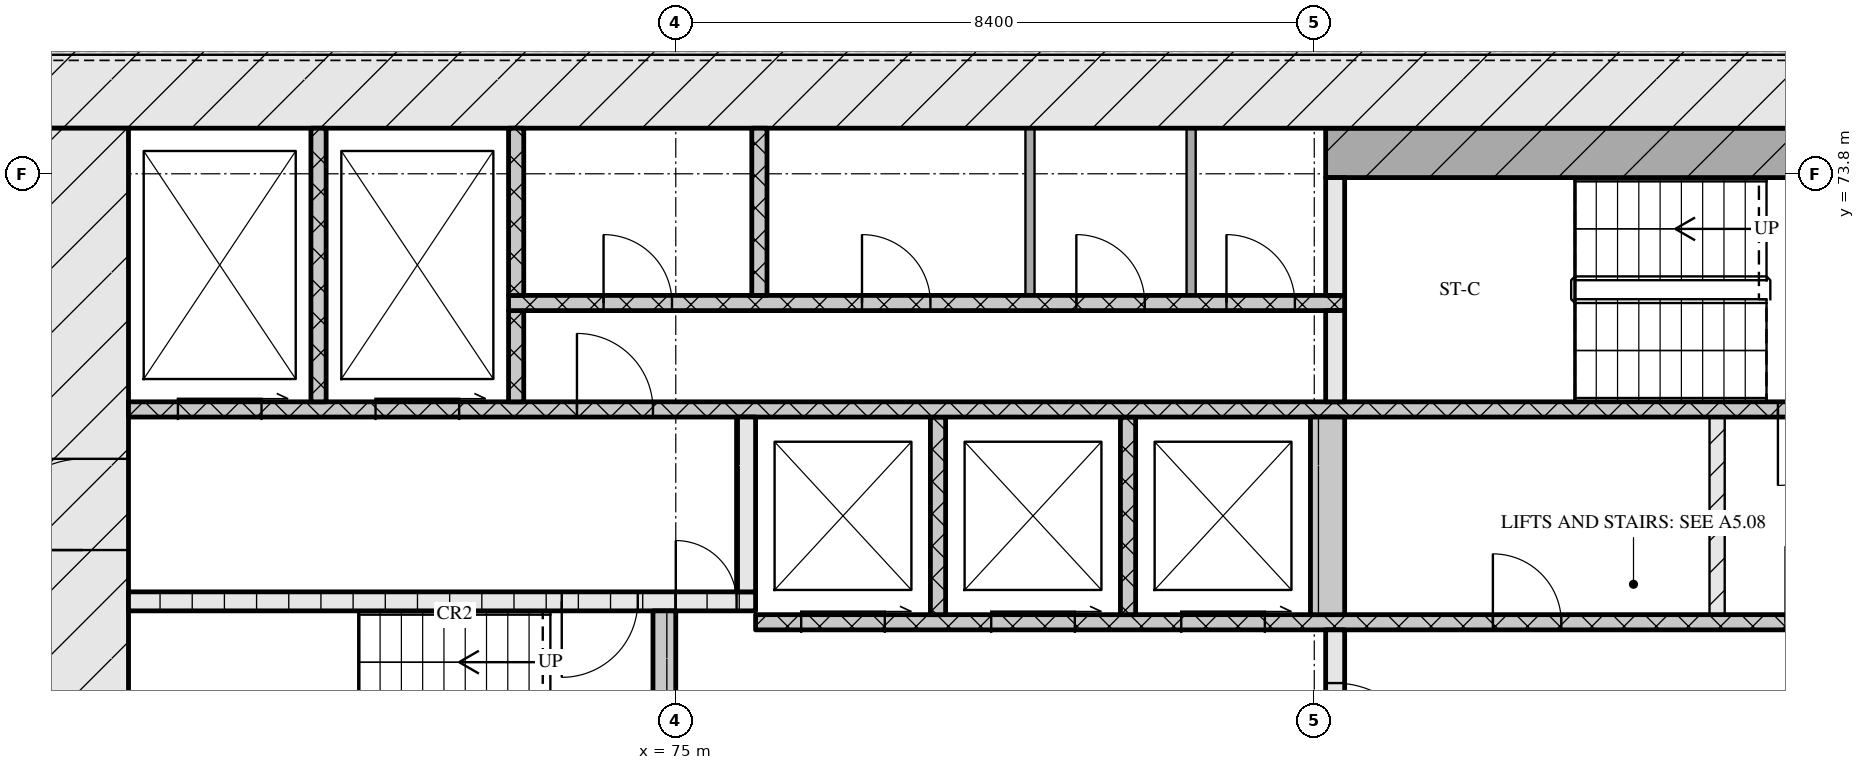
"""IFC4 building model, lengths in metres.
Left out: names, types, materials, properties, quantities, classifications, styles, units other than length and angle.
Written with IfcOpenShell. Run it as: python <this file> out.ifc"""

import sys

from ifc_helpers import new_model, si_unit, direction, frame, frame_2d, origin, place, context, subcontext, project, spatial, rectangle, extrude, element, fill, save


model = new_model("IFC4")
c1 = context("Model", 3, precision=1e-05, world=origin(), true_north=direction((0.0, 1.0)))
c2 = subcontext(c1, "Body", "Model", "MODEL_VIEW")
j1 = project(units=[si_unit("LENGTHUNIT", "METRE"), si_unit("PLANEANGLEUNIT", "RADIAN")], contexts=[c1])
p1 = place(None, origin())
s1 = spatial("IfcSite", under=j1, at=p1, CompositionType="ELEMENT")
p2 = place(p1, origin())
s2 = spatial("IfcBuilding", under=s1, at=p2, CompositionType="ELEMENT")
p3 = place(p2, frame((0.0, 0.0, 51.6)))
s3 = spatial("IfcBuildingStorey", under=s2, at=p3, CompositionType="ELEMENT", Elevation=51.6)
p4 = place(p3, frame((66.6, 75.0, 0.0), z_axis=(0.0, 0.0, 1.0), x_axis=(1.0, 0.0, 0.0)))
e1 = element("IfcWall", 1, at=p4, inside=s3, PredefinedType="SOLIDWALL", context=c2, shape_type="SweptSolid", body=[
    extrude(rectangle(XDim=42.0, YDim=1.2, at=frame_2d((21.0, 0.0))), origin(), (0.0, 0.0, 1.0), 3.32),
])
p5 = place(p3, frame((67.2, 62.4, 0.0), z_axis=(0.0, 0.0, 1.0), x_axis=(0.0, 1.0, 0.0)))
e2 = element("IfcWall", 2, at=p5, inside=s3, PredefinedType="SOLIDWALL", context=c2, shape_type="SweptSolid", body=[
    extrude(rectangle(XDim=12.0, YDim=1.2, at=frame_2d((6.0, 0.0))), origin(), (0.0, 0.0, 1.0), 3.32),
])
p6 = place(p5, frame((6.45, 0.0, 0.0)))
e3 = element("IfcOpeningElement", 3, at=p6, cuts=e2, PredefinedType="OPENING", context=c2, shape_type="SweptSolid", body=[
    extrude(rectangle(XDim=1.2, YDim=2.1, at=frame_2d((0.6, 1.05))), frame((0.0, 0.61, 0.0), z_axis=(0.0, -1.0, 0.0), x_axis=(1.0, 0.0, 0.0)), (0.0, 0.0, 1.0), 1.22),
])
p7 = place(p3, frame((74.85, 65.2, 0.0), z_axis=(0.0, 0.0, 1.0), x_axis=(0.0, 1.0, 0.0)))
e4 = element("IfcWall", 4, at=p7, inside=s3, PredefinedType="SOLIDWALL", context=c2, shape_type="SweptSolid", body=[
    extrude(rectangle(XDim=2.85, YDim=0.3, at=frame_2d((1.425, 0.0))), origin(), (0.0, 0.0, 1.0), 3.32),
])
p8 = place(p3, frame((83.675, 65.2, 0.0), z_axis=(0.0, 0.0, 1.0), x_axis=(0.0, 1.0, 0.0)))
e5 = element("IfcWall", 5, at=p8, inside=s3, PredefinedType="SOLIDWALL", context=c2, shape_type="SweptSolid", body=[
    extrude(rectangle(XDim=2.6, YDim=0.25, at=frame_2d((1.3, 0.0))), origin(), (0.0, 0.0, 1.0), 3.32),
])
p9 = place(p8, frame((0.7, 0.0, 0.0)))
e6 = element("IfcOpeningElement", 6, at=p9, cuts=e5, PredefinedType="OPENING", context=c2, shape_type="SweptSolid", body=[
    extrude(rectangle(XDim=1.2, YDim=2.1, at=frame_2d((0.6, 1.05))), frame((0.0, 0.135, 0.0), z_axis=(0.0, -1.0, 0.0), x_axis=(1.0, 0.0, 0.0)), (0.0, 0.0, 1.0), 0.27),
])
p10 = place(p3, frame((76.05, 67.9, 0.0), z_axis=(0.0, 0.0, 1.0), x_axis=(1.0, 0.0, 0.0)))
e7 = element("IfcWall", 7, at=p10, inside=s3, PredefinedType="SOLIDWALL", context=c2, shape_type="SweptSolid", body=[
    extrude(rectangle(XDim=23.1, YDim=0.2, at=frame_2d((11.55, 0.0))), origin(), (0.0, 0.0, 1.0), 3.32),
])
p11 = place(p10, frame((0.6, 0.0, 0.0)))
e8 = element("IfcOpeningElement", 8, at=p11, cuts=e7, PredefinedType="OPENING", context=c2, shape_type="SweptSolid", body=[
    extrude(rectangle(XDim=1.1, YDim=2.1, at=frame_2d((0.55, 1.05))), frame((0.0, 0.11, 0.0), z_axis=(0.0, -1.0, 0.0), x_axis=(1.0, 0.0, 0.0)), (0.0, 0.0, 1.0), 0.22),
])
p12 = place(p10, frame((3.1, 0.0, 0.0)))
e9 = element("IfcOpeningElement", 9, at=p12, cuts=e7, PredefinedType="OPENING", context=c2, shape_type="SweptSolid", body=[
    extrude(rectangle(XDim=1.1, YDim=2.1, at=frame_2d((0.55, 1.05))), frame((0.0, 0.11, 0.0), z_axis=(0.0, -1.0, 0.0), x_axis=(1.0, 0.0, 0.0)), (0.0, 0.0, 1.0), 0.22),
])
p13 = place(p10, frame((5.6, 0.0, 0.0)))
e10 = element("IfcOpeningElement", 10, at=p13, cuts=e7, PredefinedType="OPENING", context=c2, shape_type="SweptSolid", body=[
    extrude(rectangle(XDim=1.1, YDim=2.1, at=frame_2d((0.55, 1.05))), frame((0.0, 0.11, 0.0), z_axis=(0.0, -1.0, 0.0), x_axis=(1.0, 0.0, 0.0)), (0.0, 0.0, 1.0), 0.22),
])
p14 = place(p10, frame((9.7, 0.0, 0.0)))
e11 = element("IfcOpeningElement", 11, at=p14, cuts=e7, PredefinedType="OPENING", context=c2, shape_type="SweptSolid", body=[
    extrude(rectangle(XDim=0.9, YDim=2.1, at=frame_2d((0.45, 1.05))), frame((0.0, 0.11, 0.0), z_axis=(0.0, -1.0, 0.0), x_axis=(1.0, 0.0, 0.0)), (0.0, 0.0, 1.0), 0.22),
])
p15 = place(p10, frame((13.55, 0.0, 0.0)))
e12 = element("IfcOpeningElement", 12, at=p15, cuts=e7, PredefinedType="OPENING", context=c2, shape_type="SweptSolid", body=[
    extrude(rectangle(XDim=1.0, YDim=2.1, at=frame_2d((0.5, 1.05))), frame((0.0, 0.11, 0.0), z_axis=(0.0, -1.0, 0.0), x_axis=(1.0, 0.0, 0.0)), (0.0, 0.0, 1.0), 0.22),
])
for number, where, z_axis, x_axis in (
    (13, (78.45, 68.0, 0.0), (0.0, 0.0, 1.0), (0.0, 1.0, 0.0)),
    (14, (80.95, 68.0, 0.0), (0.0, 0.0, 1.0), (0.0, 1.0, 0.0)),
):
    element("IfcWall", number, at=place(p3, frame(where, z_axis=z_axis, x_axis=x_axis)), inside=s3, PredefinedType="SOLIDWALL", context=c2, shape_type="SweptSolid", body=[
        extrude(rectangle(XDim=2.6, YDim=0.2, at=frame_2d((1.3, 0.0))), origin(), (0.0, 0.0, 1.0), 3.32),
    ])
p16 = place(p3, frame((83.575, 68.0, 0.0), z_axis=(0.0, 0.0, 1.0), x_axis=(0.0, 1.0, 0.0)))
e15 = element("IfcWall", 15, at=p16, inside=s3, PredefinedType="SOLIDWALL", context=c2, shape_type="SweptSolid", body=[
    extrude(rectangle(XDim=2.6, YDim=0.45, at=frame_2d((1.3, 0.0))), origin(), (0.0, 0.0, 1.0), 3.32),
])
p17 = place(p3, frame((88.7, 68.0, 0.0), z_axis=(0.0, 0.0, 1.0), x_axis=(0.0, 1.0, 0.0)))
e16 = element("IfcWall", 16, at=p17, inside=s3, PredefinedType="PARTITIONING", context=c2, shape_type="SweptSolid", body=[
    extrude(rectangle(XDim=2.6, YDim=0.2, at=frame_2d((1.3, 0.0))), origin(), (0.0, 0.0, 1.0), 3.32),
])
p18 = place(p3, frame((67.8, 68.175, 0.0), z_axis=(0.0, 0.0, 1.0), x_axis=(1.0, 0.0, 0.0)))
e17 = element("IfcWall", 17, at=p18, inside=s3, PredefinedType="SOLIDWALL", context=c2, shape_type="SweptSolid", body=[
    extrude(rectangle(XDim=8.25, YDim=0.25, at=frame_2d((4.125, 0.0))), origin(), (0.0, 0.0, 1.0), 3.32),
])
p19 = place(p18, frame((5.7, 0.0, 0.0)))
e18 = element("IfcOpeningElement", 18, at=p19, cuts=e17, PredefinedType="OPENING", context=c2, shape_type="SweptSolid", body=[
    extrude(rectangle(XDim=1.0, YDim=2.1, at=frame_2d((0.5, 1.05))), frame((0.0, 0.135, 0.0), z_axis=(0.0, -1.0, 0.0), x_axis=(1.0, 0.0, 0.0)), (0.0, 0.0, 1.0), 0.27),
])
p20 = place(p18, frame((7.2, 0.0, 0.0)))
e19 = element("IfcOpeningElement", 19, at=p20, cuts=e17, PredefinedType="OPENING", context=c2, shape_type="SweptSolid", body=[
    extrude(rectangle(XDim=0.8, YDim=2.1, at=frame_2d((0.4, 1.05))), frame((0.0, 0.135, 0.0), z_axis=(0.0, -1.0, 0.0), x_axis=(1.0, 0.0, 0.0)), (0.0, 0.0, 1.0), 0.27),
])
p21 = place(p3, frame((75.925, 68.3, 0.0), z_axis=(0.0, 0.0, 1.0), x_axis=(0.0, 1.0, 0.0)))
e20 = element("IfcWall", 20, at=p21, inside=s3, PredefinedType="SOLIDWALL", context=c2, shape_type="SweptSolid", body=[
    extrude(rectangle(XDim=2.3, YDim=0.25, at=frame_2d((1.15, 0.0))), origin(), (0.0, 0.0, 1.0), 3.32),
])
p22 = place(p3, frame((67.8, 70.7, 0.0), z_axis=(0.0, 0.0, 1.0), x_axis=(1.0, 0.0, 0.0)))
e21 = element("IfcWall", 21, at=p22, inside=s3, PredefinedType="SOLIDWALL", context=c2, shape_type="SweptSolid", body=[
    extrude(rectangle(XDim=39.6, YDim=0.2, at=frame_2d((19.8, 0.0))), origin(), (0.0, 0.0, 1.0), 3.32),
])
p23 = place(p22, frame((0.65, 0.0, 0.0)))
e22 = element("IfcOpeningElement", 22, at=p23, cuts=e21, PredefinedType="OPENING", context=c2, shape_type="SweptSolid", body=[
    extrude(rectangle(XDim=1.1, YDim=2.1, at=frame_2d((0.55, 1.05))), frame((0.0, 0.11, 0.0), z_axis=(0.0, -1.0, 0.0), x_axis=(1.0, 0.0, 0.0)), (0.0, 0.0, 1.0), 0.22),
])
p24 = place(p22, frame((3.25, 0.0, 0.0)))
e23 = element("IfcOpeningElement", 23, at=p24, cuts=e21, PredefinedType="OPENING", context=c2, shape_type="SweptSolid", body=[
    extrude(rectangle(XDim=1.1, YDim=2.1, at=frame_2d((0.55, 1.05))), frame((0.0, 0.11, 0.0), z_axis=(0.0, -1.0, 0.0), x_axis=(1.0, 0.0, 0.0)), (0.0, 0.0, 1.0), 0.22),
])
p25 = place(p22, frame((5.9, 0.0, 0.0)))
e24 = element("IfcOpeningElement", 24, at=p25, cuts=e21, PredefinedType="OPENING", context=c2, shape_type="SweptSolid", body=[
    extrude(rectangle(XDim=1.0, YDim=2.1, at=frame_2d((0.5, 1.05))), frame((0.0, 0.11, 0.0), z_axis=(0.0, -1.0, 0.0), x_axis=(1.0, 0.0, 0.0)), (0.0, 0.0, 1.0), 0.22),
])
p26 = place(p22, frame((21.7, 0.0, 0.0)))
e25 = element("IfcOpeningElement", 25, at=p26, cuts=e21, PredefinedType="OPENING", context=c2, shape_type="SweptSolid", body=[
    extrude(rectangle(XDim=1.0, YDim=2.1, at=frame_2d((0.5, 1.05))), frame((0.0, 0.11, 0.0), z_axis=(0.0, -1.0, 0.0), x_axis=(1.0, 0.0, 0.0)), (0.0, 0.0, 1.0), 0.22),
])
p27 = place(p22, frame((32.7, 0.0, 0.0)))
e26 = element("IfcOpeningElement", 26, at=p27, cuts=e21, PredefinedType="OPENING", context=c2, shape_type="SweptSolid", body=[
    extrude(rectangle(XDim=1.0, YDim=2.1, at=frame_2d((0.5, 1.05))), frame((0.0, 0.11, 0.0), z_axis=(0.0, -1.0, 0.0), x_axis=(1.0, 0.0, 0.0)), (0.0, 0.0, 1.0), 0.22),
])
p28 = place(p22, frame((35.25, 0.0, 0.0)))
e27 = element("IfcOpeningElement", 27, at=p28, cuts=e21, PredefinedType="OPENING", context=c2, shape_type="SweptSolid", body=[
    extrude(rectangle(XDim=1.1, YDim=2.1, at=frame_2d((0.55, 1.05))), frame((0.0, 0.11, 0.0), z_axis=(0.0, -1.0, 0.0), x_axis=(1.0, 0.0, 0.0)), (0.0, 0.0, 1.0), 0.22),
])
p29 = place(p22, frame((37.85, 0.0, 0.0)))
e28 = element("IfcOpeningElement", 28, at=p29, cuts=e21, PredefinedType="OPENING", context=c2, shape_type="SweptSolid", body=[
    extrude(rectangle(XDim=1.1, YDim=2.1, at=frame_2d((0.55, 1.05))), frame((0.0, 0.11, 0.0), z_axis=(0.0, -1.0, 0.0), x_axis=(1.0, 0.0, 0.0)), (0.0, 0.0, 1.0), 0.22),
])
p30 = place(p3, frame((70.3, 70.8, 0.0), z_axis=(0.0, 0.0, 1.0), x_axis=(0.0, 1.0, 0.0)))
e29 = element("IfcWall", 29, at=p30, inside=s3, PredefinedType="SOLIDWALL", context=c2, shape_type="SweptSolid", body=[
    extrude(rectangle(XDim=3.6, YDim=0.2, at=frame_2d((1.8, 0.0))), origin(), (0.0, 0.0, 1.0), 3.32),
])
p31 = place(p3, frame((72.9, 70.8, 0.0), z_axis=(0.0, 0.0, 1.0), x_axis=(0.0, 1.0, 0.0)))
e30 = element("IfcWall", 30, at=p31, inside=s3, PredefinedType="SOLIDWALL", context=c2, shape_type="SweptSolid", body=[
    extrude(rectangle(XDim=1.2, YDim=0.2, at=frame_2d((0.6, 0.0))), origin(), (0.0, 0.0, 1.0), 3.32),
])
p32 = place(p3, frame((83.675, 70.8, 0.0), z_axis=(0.0, 0.0, 1.0), x_axis=(0.0, 1.0, 0.0)))
e31 = element("IfcWall", 31, at=p32, inside=s3, PredefinedType="SOLIDWALL", context=c2, shape_type="SweptSolid", body=[
    extrude(rectangle(XDim=1.2, YDim=0.25, at=frame_2d((0.6, 0.0))), origin(), (0.0, 0.0, 1.0), 3.32),
])
p33 = place(p3, frame((72.8, 72.1, 0.0), z_axis=(0.0, 0.0, 1.0), x_axis=(1.0, 0.0, 0.0)))
e32 = element("IfcWall", 32, at=p33, inside=s3, PredefinedType="SOLIDWALL", context=c2, shape_type="SweptSolid", body=[
    extrude(rectangle(XDim=11.0, YDim=0.2, at=frame_2d((5.5, 0.0))), origin(), (0.0, 0.0, 1.0), 3.32),
])
p34 = place(p33, frame((1.25, 0.0, 0.0)))
e33 = element("IfcOpeningElement", 33, at=p34, cuts=e32, PredefinedType="OPENING", context=c2, shape_type="SweptSolid", body=[
    extrude(rectangle(XDim=0.9, YDim=2.1, at=frame_2d((0.45, 1.05))), frame((0.0, 0.11, 0.0), z_axis=(0.0, -1.0, 0.0), x_axis=(1.0, 0.0, 0.0)), (0.0, 0.0, 1.0), 0.22),
])
p35 = place(p33, frame((4.65, 0.0, 0.0)))
e34 = element("IfcOpeningElement", 34, at=p35, cuts=e32, PredefinedType="OPENING", context=c2, shape_type="SweptSolid", body=[
    extrude(rectangle(XDim=0.9, YDim=2.1, at=frame_2d((0.45, 1.05))), frame((0.0, 0.11, 0.0), z_axis=(0.0, -1.0, 0.0), x_axis=(1.0, 0.0, 0.0)), (0.0, 0.0, 1.0), 0.22),
])
p36 = place(p33, frame((7.47, 0.0, 0.0)))
e35 = element("IfcOpeningElement", 35, at=p36, cuts=e32, PredefinedType="OPENING", context=c2, shape_type="SweptSolid", body=[
    extrude(rectangle(XDim=0.9, YDim=2.1, at=frame_2d((0.45, 1.05))), frame((0.0, 0.11, 0.0), z_axis=(0.0, -1.0, 0.0), x_axis=(1.0, 0.0, 0.0)), (0.0, 0.0, 1.0), 0.22),
])
p37 = place(p33, frame((9.445, 0.0, 0.0)))
e36 = element("IfcOpeningElement", 36, at=p37, cuts=e32, PredefinedType="OPENING", context=c2, shape_type="SweptSolid", body=[
    extrude(rectangle(XDim=0.9, YDim=2.1, at=frame_2d((0.45, 1.05))), frame((0.0, 0.11, 0.0), z_axis=(0.0, -1.0, 0.0), x_axis=(1.0, 0.0, 0.0)), (0.0, 0.0, 1.0), 0.22),
])
for number, where, z_axis, x_axis in (
    (37, (72.9, 72.2, 0.0), (0.0, 0.0, 1.0), (0.0, 1.0, 0.0)),
    (38, (76.1, 72.2, 0.0), (0.0, 0.0, 1.0), (0.0, 1.0, 0.0)),
):
    element("IfcWall", number, at=place(p3, frame(where, z_axis=z_axis, x_axis=x_axis)), inside=s3, PredefinedType="SOLIDWALL", context=c2, shape_type="SweptSolid", body=[
        extrude(rectangle(XDim=2.2, YDim=0.2, at=frame_2d((1.1, 0.0))), origin(), (0.0, 0.0, 1.0), 3.32),
    ])
for number, where, z_axis, x_axis in (
    (39, (79.66, 72.2, 0.0), (0.0, 0.0, 1.0), (0.0, 1.0, 0.0)),
    (40, (81.78, 72.2, 0.0), (0.0, 0.0, 1.0), (0.0, 1.0, 0.0)),
):
    element("IfcWall", number, at=place(p3, frame(where, z_axis=z_axis, x_axis=x_axis)), inside=s3, PredefinedType="PARTITIONING", context=c2, shape_type="SweptSolid", body=[
        extrude(rectangle(XDim=2.2, YDim=0.12, at=frame_2d((1.1, 0.0))), origin(), (0.0, 0.0, 1.0), 3.32),
    ])
p38 = place(p3, frame((83.675, 72.2, 0.0), z_axis=(0.0, 0.0, 1.0), x_axis=(0.0, 1.0, 0.0)))
e41 = element("IfcWall", 41, at=p38, inside=s3, PredefinedType="SOLIDWALL", context=c2, shape_type="SweptSolid", body=[
    extrude(rectangle(XDim=1.55, YDim=0.25, at=frame_2d((0.775, 0.0))), origin(), (0.0, 0.0, 1.0), 3.32),
])
p39 = place(p3, frame((83.55, 74.075, 0.0), z_axis=(0.0, 0.0, 1.0), x_axis=(1.0, 0.0, 0.0)))
e42 = element("IfcWall", 42, at=p39, inside=s3, PredefinedType="SOLIDWALL", context=c2, shape_type="SweptSolid", body=[
    extrude(rectangle(XDim=8.1, YDim=0.65, at=frame_2d((4.05, 0.0))), origin(), (0.0, 0.0, 1.0), 3.32),
])
p40 = place(p9, origin())
e43 = element("IfcDoor", 43, at=p40, inside=s3, OperationType="SINGLE_SWING_RIGHT", PredefinedType="DOOR", context=c2, shape_type="SweptSolid", body=[
    extrude(rectangle(XDim=1.2, YDim=2.1, at=frame_2d((0.6, 1.05))), frame((0.0, 0.025, 0.0), z_axis=(0.0, -1.0, 0.0), x_axis=(1.0, 0.0, 0.0)), (0.0, 0.0, 1.0), 0.05),
])
fill(e6, e43)
p41 = place(p11, origin())
e44 = element("IfcDoor", 44, at=p41, inside=s3, OperationType="SLIDING_TO_RIGHT", PredefinedType="DOOR", context=c2, shape_type="SweptSolid", body=[
    extrude(rectangle(XDim=1.1, YDim=2.1, at=frame_2d((0.55, 1.05))), frame((0.0, 0.025, 0.0), z_axis=(0.0, -1.0, 0.0), x_axis=(1.0, 0.0, 0.0)), (0.0, 0.0, 1.0), 0.05),
])
fill(e8, e44)
p42 = place(p12, origin())
e45 = element("IfcDoor", 45, at=p42, inside=s3, OperationType="SLIDING_TO_RIGHT", PredefinedType="DOOR", context=c2, shape_type="SweptSolid", body=[
    extrude(rectangle(XDim=1.1, YDim=2.1, at=frame_2d((0.55, 1.05))), frame((0.0, 0.025, 0.0), z_axis=(0.0, -1.0, 0.0), x_axis=(1.0, 0.0, 0.0)), (0.0, 0.0, 1.0), 0.05),
])
fill(e9, e45)
p43 = place(p13, origin())
e46 = element("IfcDoor", 46, at=p43, inside=s3, OperationType="SLIDING_TO_RIGHT", PredefinedType="DOOR", context=c2, shape_type="SweptSolid", body=[
    extrude(rectangle(XDim=1.1, YDim=2.1, at=frame_2d((0.55, 1.05))), frame((0.0, 0.025, 0.0), z_axis=(0.0, -1.0, 0.0), x_axis=(1.0, 0.0, 0.0)), (0.0, 0.0, 1.0), 0.05),
])
fill(e10, e46)
p44 = place(p14, origin())
e47 = element("IfcDoor", 47, at=p44, inside=s3, OperationType="SINGLE_SWING_LEFT", PredefinedType="DOOR", context=c2, shape_type="SweptSolid", body=[
    extrude(rectangle(XDim=0.9, YDim=2.1, at=frame_2d((0.45, 1.05))), frame((0.0, 0.025, 0.0), z_axis=(0.0, -1.0, 0.0), x_axis=(1.0, 0.0, 0.0)), (0.0, 0.0, 1.0), 0.05),
])
fill(e11, e47)
p45 = place(p19, origin())
e48 = element("IfcDoor", 48, at=p45, inside=s3, OperationType="SINGLE_SWING_RIGHT", PredefinedType="DOOR", context=c2, shape_type="SweptSolid", body=[
    extrude(rectangle(XDim=1.0, YDim=2.1, at=frame_2d((0.5, 1.05))), frame((0.0, 0.025, 0.0), z_axis=(0.0, -1.0, 0.0), x_axis=(1.0, 0.0, 0.0)), (0.0, 0.0, 1.0), 0.05),
])
fill(e18, e48)
p46 = place(p20, origin())
e49 = element("IfcDoor", 49, at=p46, inside=s3, OperationType="SINGLE_SWING_LEFT", PredefinedType="DOOR", context=c2, shape_type="SweptSolid", body=[
    extrude(rectangle(XDim=0.8, YDim=2.1, at=frame_2d((0.4, 1.05))), frame((0.0, 0.025, 0.0), z_axis=(0.0, -1.0, 0.0), x_axis=(1.0, 0.0, 0.0)), (0.0, 0.0, 1.0), 0.05),
])
fill(e19, e49)
p47 = place(p6, origin())
e50 = element("IfcDoor", 50, at=p47, inside=s3, OperationType="SINGLE_SWING_LEFT", PredefinedType="DOOR", context=c2, shape_type="SweptSolid", body=[
    extrude(rectangle(XDim=1.2, YDim=2.1, at=frame_2d((0.6, 1.05))), frame((0.0, 0.025, 0.0), z_axis=(0.0, -1.0, 0.0), x_axis=(1.0, 0.0, 0.0)), (0.0, 0.0, 1.0), 0.05),
])
fill(e3, e50)
p48 = place(p23, origin())
e51 = element("IfcDoor", 51, at=p48, inside=s3, OperationType="SLIDING_TO_RIGHT", PredefinedType="DOOR", context=c2, shape_type="SweptSolid", body=[
    extrude(rectangle(XDim=1.1, YDim=2.1, at=frame_2d((0.55, 1.05))), frame((0.0, 0.025, 0.0), z_axis=(0.0, -1.0, 0.0), x_axis=(1.0, 0.0, 0.0)), (0.0, 0.0, 1.0), 0.05),
])
fill(e22, e51)
p49 = place(p24, origin())
e52 = element("IfcDoor", 52, at=p49, inside=s3, OperationType="SLIDING_TO_RIGHT", PredefinedType="DOOR", context=c2, shape_type="SweptSolid", body=[
    extrude(rectangle(XDim=1.1, YDim=2.1, at=frame_2d((0.55, 1.05))), frame((0.0, 0.025, 0.0), z_axis=(0.0, -1.0, 0.0), x_axis=(1.0, 0.0, 0.0)), (0.0, 0.0, 1.0), 0.05),
])
fill(e23, e52)
p50 = place(p25, origin())
e53 = element("IfcDoor", 53, at=p50, inside=s3, OperationType="SINGLE_SWING_LEFT", PredefinedType="DOOR", context=c2, shape_type="SweptSolid", body=[
    extrude(rectangle(XDim=1.0, YDim=2.1, at=frame_2d((0.5, 1.05))), frame((0.0, 0.025, 0.0), z_axis=(0.0, -1.0, 0.0), x_axis=(1.0, 0.0, 0.0)), (0.0, 0.0, 1.0), 0.05),
])
fill(e24, e53)
p51 = place(p26, origin())
e54 = element("IfcDoor", 54, at=p51, inside=s3, OperationType="SINGLE_SWING_RIGHT", PredefinedType="DOOR", context=c2, shape_type="SweptSolid", body=[
    extrude(rectangle(XDim=1.0, YDim=2.1, at=frame_2d((0.5, 1.05))), frame((0.0, 0.025, 0.0), z_axis=(0.0, -1.0, 0.0), x_axis=(1.0, 0.0, 0.0)), (0.0, 0.0, 1.0), 0.05),
])
fill(e25, e54)
p52 = place(p34, origin())
e55 = element("IfcDoor", 55, at=p52, inside=s3, OperationType="SINGLE_SWING_LEFT", PredefinedType="DOOR", context=c2, shape_type="SweptSolid", body=[
    extrude(rectangle(XDim=0.9, YDim=2.1, at=frame_2d((0.45, 1.05))), frame((0.0, 0.025, 0.0), z_axis=(0.0, -1.0, 0.0), x_axis=(1.0, 0.0, 0.0)), (0.0, 0.0, 1.0), 0.05),
])
fill(e33, e55)
p53 = place(p35, origin())
e56 = element("IfcDoor", 56, at=p53, inside=s3, OperationType="SINGLE_SWING_LEFT", PredefinedType="DOOR", context=c2, shape_type="SweptSolid", body=[
    extrude(rectangle(XDim=0.9, YDim=2.1, at=frame_2d((0.45, 1.05))), frame((0.0, 0.025, 0.0), z_axis=(0.0, -1.0, 0.0), x_axis=(1.0, 0.0, 0.0)), (0.0, 0.0, 1.0), 0.05),
])
fill(e34, e56)
p54 = place(p36, origin())
e57 = element("IfcDoor", 57, at=p54, inside=s3, OperationType="SINGLE_SWING_LEFT", PredefinedType="DOOR", context=c2, shape_type="SweptSolid", body=[
    extrude(rectangle(XDim=0.9, YDim=2.1, at=frame_2d((0.45, 1.05))), frame((0.0, 0.025, 0.0), z_axis=(0.0, -1.0, 0.0), x_axis=(1.0, 0.0, 0.0)), (0.0, 0.0, 1.0), 0.05),
])
fill(e35, e57)
p55 = place(p37, origin())
e58 = element("IfcDoor", 58, at=p55, inside=s3, OperationType="SINGLE_SWING_LEFT", PredefinedType="DOOR", context=c2, shape_type="SweptSolid", body=[
    extrude(rectangle(XDim=0.9, YDim=2.1, at=frame_2d((0.45, 1.05))), frame((0.0, 0.025, 0.0), z_axis=(0.0, -1.0, 0.0), x_axis=(1.0, 0.0, 0.0)), (0.0, 0.0, 1.0), 0.05),
])
fill(e36, e58)
save(model, sys.argv[1])
